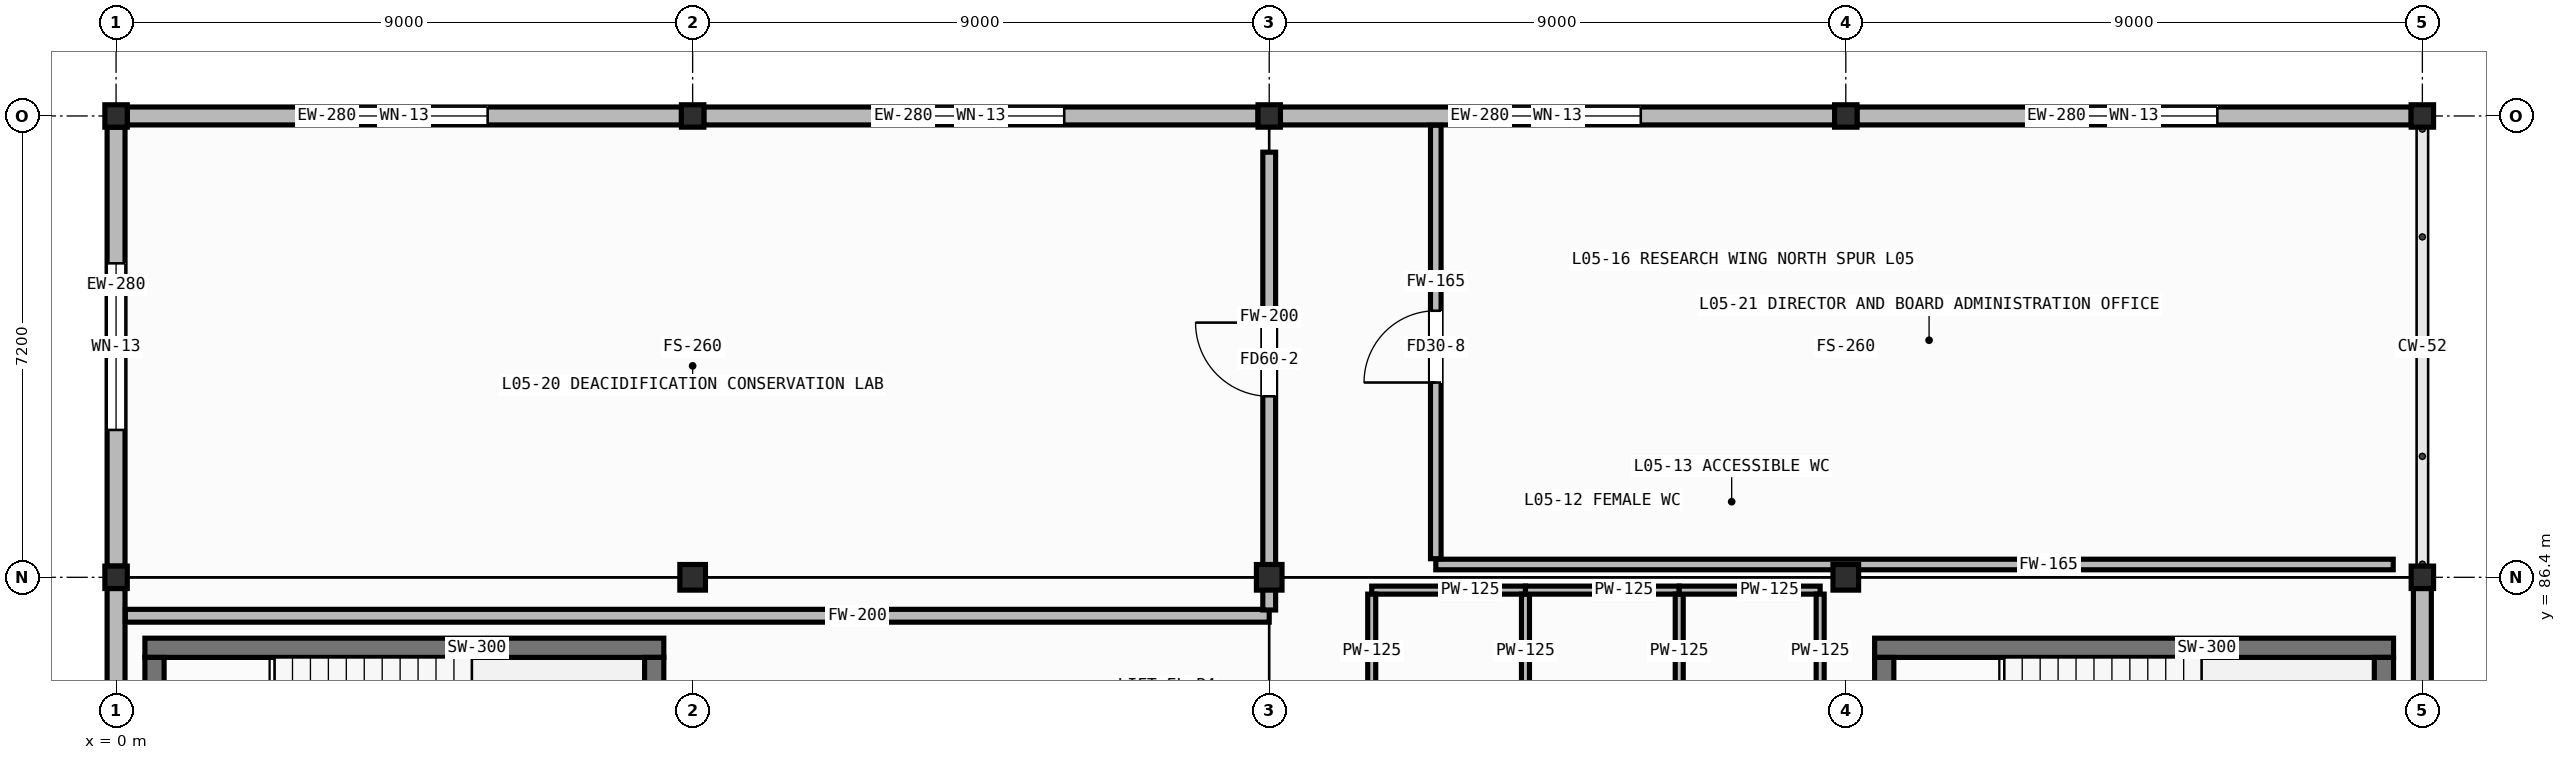
"""IFC4 building model, lengths in metres.
Left out: names, types, materials, properties, quantities, classifications, styles, units other than length and angle.
Written with IfcOpenShell. Run it as: python <this file> out.ifc"""

import sys

from ifc_helpers import new_model, si_unit, direction, frame, frame_2d, origin, origin_2d, place, context, subcontext, project, spatial, rectangle, hollow_rectangle, extrude, element, fill, save


model = new_model("IFC4")
c1 = context("Model", 3, precision=1e-05, world=origin(), true_north=direction((0.0, 1.0)))
c2 = subcontext(c1, "Body", "Model", "MODEL_VIEW")
j1 = project(units=[si_unit("LENGTHUNIT", "METRE"), si_unit("PLANEANGLEUNIT", "RADIAN")], contexts=[c1])
p1 = place(None, origin())
s1 = spatial("IfcSite", under=j1, at=p1, CompositionType="ELEMENT")
p2 = place(p1, origin())
s2 = spatial("IfcBuilding", under=s1, at=p2, CompositionType="ELEMENT")
p3 = place(p2, frame((0.0, 0.0, 17.0)))
s3 = spatial("IfcBuildingStorey", under=s2, at=p3, CompositionType="ELEMENT", Elevation=17.0)
for number, where, z_axis, x_axis in (
    (1, (0.0, 86.4, 0.0), (0.0, 0.0, 1.0), (1.0, 0.0, 0.0)),
    (2, (0.0, 93.6, 0.0), (0.0, 0.0, 1.0), (1.0, 0.0, 0.0)),
):
    element("IfcColumn", number, at=place(p3, frame(where, z_axis=z_axis, x_axis=x_axis)), inside=s3, PredefinedType="COLUMN", context=c2, shape_type="SweptSolid", body=[
        extrude(hollow_rectangle(XDim=0.35, YDim=0.35, WallThickness=0.012, at=origin_2d()), origin(), (0.0, 0.0, 1.0), 3.6),
    ])
p4 = place(p3, frame((9.0, 86.4, 0.0), z_axis=(0.0, 0.0, 1.0), x_axis=(1.0, 0.0, 0.0)))
e3 = element("IfcColumn", 3, at=p4, inside=s3, PredefinedType="COLUMN", context=c2, shape_type="SweptSolid", body=[
    extrude(hollow_rectangle(XDim=0.4, YDim=0.4, WallThickness=0.016, at=origin_2d()), origin(), (0.0, 0.0, 1.0), 3.6),
])
p5 = place(p3, frame((9.0, 93.6, 0.0), z_axis=(0.0, 0.0, 1.0), x_axis=(1.0, 0.0, 0.0)))
e4 = element("IfcColumn", 4, at=p5, inside=s3, PredefinedType="COLUMN", context=c2, shape_type="SweptSolid", body=[
    extrude(hollow_rectangle(XDim=0.35, YDim=0.35, WallThickness=0.012, at=origin_2d()), origin(), (0.0, 0.0, 1.0), 3.6),
])
p6 = place(p3, frame((18.0, 86.4, 0.0), z_axis=(0.0, 0.0, 1.0), x_axis=(1.0, 0.0, 0.0)))
e5 = element("IfcColumn", 5, at=p6, inside=s3, PredefinedType="COLUMN", context=c2, shape_type="SweptSolid", body=[
    extrude(hollow_rectangle(XDim=0.4, YDim=0.4, WallThickness=0.016, at=origin_2d()), origin(), (0.0, 0.0, 1.0), 3.6),
])
p7 = place(p3, frame((18.0, 93.6, 0.0), z_axis=(0.0, 0.0, 1.0), x_axis=(1.0, 0.0, 0.0)))
e6 = element("IfcColumn", 6, at=p7, inside=s3, PredefinedType="COLUMN", context=c2, shape_type="SweptSolid", body=[
    extrude(hollow_rectangle(XDim=0.35, YDim=0.35, WallThickness=0.012, at=origin_2d()), origin(), (0.0, 0.0, 1.0), 3.6),
])
p8 = place(p3, frame((27.0, 86.4, 0.0), z_axis=(0.0, 0.0, 1.0), x_axis=(1.0, 0.0, 0.0)))
e7 = element("IfcColumn", 7, at=p8, inside=s3, PredefinedType="COLUMN", context=c2, shape_type="SweptSolid", body=[
    extrude(hollow_rectangle(XDim=0.4, YDim=0.4, WallThickness=0.016, at=origin_2d()), origin(), (0.0, 0.0, 1.0), 3.6),
])
for number, where, z_axis, x_axis in (
    (8, (27.0, 93.6, 0.0), (0.0, 0.0, 1.0), (1.0, 0.0, 0.0)),
    (9, (36.0, 86.4, 0.0), (0.0, 0.0, 1.0), (1.0, 0.0, 0.0)),
    (10, (36.0, 93.6, 0.0), (0.0, 0.0, 1.0), (1.0, 0.0, 0.0)),
):
    element("IfcColumn", number, at=place(p3, frame(where, z_axis=z_axis, x_axis=x_axis)), inside=s3, PredefinedType="COLUMN", context=c2, shape_type="SweptSolid", body=[
        extrude(hollow_rectangle(XDim=0.35, YDim=0.35, WallThickness=0.012, at=origin_2d()), origin(), (0.0, 0.0, 1.0), 3.6),
    ])
p9 = place(p3, frame((8.825, 93.6, 0.0), z_axis=(0.0, 0.0, 1.0), x_axis=(-1.0, 0.0, 0.0)))
e11 = element("IfcWall", 11, at=p9, inside=s3, PredefinedType="STANDARD", context=c2, shape_type="SweptSolid", body=[
    extrude(rectangle(XDim=8.65, YDim=0.28, at=frame_2d((4.325, 0.0))), origin(), (0.0, 0.0, 1.0), 2.95),
])
p10 = place(p9, frame((3.025, 0.0, 0.85)))
e12 = element("IfcOpeningElement", 12, at=p10, cuts=e11, PredefinedType="OPENING", context=c2, shape_type="SweptSolid", body=[
    extrude(rectangle(XDim=2.6, YDim=1.6, at=frame_2d((1.3, 0.8))), frame((0.0, 0.152, 0.0), z_axis=(0.0, -1.0, 0.0), x_axis=(1.0, 0.0, 0.0)), (0.0, 0.0, 1.0), 0.304),
])
p11 = place(p3, frame((17.825, 93.6, 0.0), z_axis=(0.0, 0.0, 1.0), x_axis=(-1.0, 0.0, 0.0)))
e13 = element("IfcWall", 13, at=p11, inside=s3, PredefinedType="STANDARD", context=c2, shape_type="SweptSolid", body=[
    extrude(rectangle(XDim=8.65, YDim=0.28, at=frame_2d((4.325, 0.0))), origin(), (0.0, 0.0, 1.0), 2.95),
])
p12 = place(p11, frame((3.025, 0.0, 0.85)))
e14 = element("IfcOpeningElement", 14, at=p12, cuts=e13, PredefinedType="OPENING", context=c2, shape_type="SweptSolid", body=[
    extrude(rectangle(XDim=2.6, YDim=1.6, at=frame_2d((1.3, 0.8))), frame((0.0, 0.152, 0.0), z_axis=(0.0, -1.0, 0.0), x_axis=(1.0, 0.0, 0.0)), (0.0, 0.0, 1.0), 0.304),
])
p13 = place(p3, frame((26.825, 93.6, 0.0), z_axis=(0.0, 0.0, 1.0), x_axis=(-1.0, 0.0, 0.0)))
e15 = element("IfcWall", 15, at=p13, inside=s3, PredefinedType="STANDARD", context=c2, shape_type="SweptSolid", body=[
    extrude(rectangle(XDim=8.65, YDim=0.28, at=frame_2d((4.325, 0.0))), origin(), (0.0, 0.0, 1.0), 2.95),
])
p14 = place(p13, frame((3.025, 0.0, 0.85)))
e16 = element("IfcOpeningElement", 16, at=p14, cuts=e15, PredefinedType="OPENING", context=c2, shape_type="SweptSolid", body=[
    extrude(rectangle(XDim=2.6, YDim=1.6, at=frame_2d((1.3, 0.8))), frame((0.0, 0.152, 0.0), z_axis=(0.0, -1.0, 0.0), x_axis=(1.0, 0.0, 0.0)), (0.0, 0.0, 1.0), 0.304),
])
p15 = place(p3, frame((35.825, 93.6, 0.0), z_axis=(0.0, 0.0, 1.0), x_axis=(-1.0, 0.0, 0.0)))
e17 = element("IfcWall", 17, at=p15, inside=s3, PredefinedType="STANDARD", context=c2, shape_type="SweptSolid", body=[
    extrude(rectangle(XDim=8.65, YDim=0.28, at=frame_2d((4.325, 0.0))), origin(), (0.0, 0.0, 1.0), 2.95),
])
p16 = place(p15, frame((3.025, 0.0, 0.85)))
e18 = element("IfcOpeningElement", 18, at=p16, cuts=e17, PredefinedType="OPENING", context=c2, shape_type="SweptSolid", body=[
    extrude(rectangle(XDim=2.6, YDim=1.6, at=frame_2d((1.3, 0.8))), frame((0.0, 0.152, 0.0), z_axis=(0.0, -1.0, 0.0), x_axis=(1.0, 0.0, 0.0)), (0.0, 0.0, 1.0), 0.304),
])
p17 = place(p3, frame((0.0, 79.375, 0.0), z_axis=(0.0, 0.0, 1.0), x_axis=(0.0, 1.0, 0.0)))
e19 = element("IfcWall", 19, at=p17, inside=s3, PredefinedType="STANDARD", context=c2, shape_type="SweptSolid", body=[
    extrude(rectangle(XDim=6.85, YDim=0.28, at=frame_2d((3.425, 0.0))), origin(), (0.0, 0.0, 1.0), 2.94),
])
p18 = place(p3, frame((0.0, 86.575, 0.0), z_axis=(0.0, 0.0, 1.0), x_axis=(0.0, 1.0, 0.0)))
e20 = element("IfcWall", 20, at=p18, inside=s3, PredefinedType="STANDARD", context=c2, shape_type="SweptSolid", body=[
    extrude(rectangle(XDim=6.85, YDim=0.28, at=frame_2d((3.425, 0.0))), origin(), (0.0, 0.0, 1.0), 2.94),
])
p19 = place(p18, frame((2.125, 0.0, 0.85)))
e21 = element("IfcOpeningElement", 21, at=p19, cuts=e20, PredefinedType="OPENING", context=c2, shape_type="SweptSolid", body=[
    extrude(rectangle(XDim=2.6, YDim=1.6, at=frame_2d((1.3, 0.8))), frame((0.0, 0.152, 0.0), z_axis=(0.0, -1.0, 0.0), x_axis=(1.0, 0.0, 0.0)), (0.0, 0.0, 1.0), 0.304),
])
p20 = place(p3, frame((36.0, 86.225, 0.0), z_axis=(0.0, 0.0, 1.0), x_axis=(0.0, -1.0, 0.0)))
e22 = element("IfcWall", 22, at=p20, inside=s3, PredefinedType="STANDARD", context=c2, shape_type="SweptSolid", body=[
    extrude(rectangle(XDim=6.85, YDim=0.28, at=frame_2d((3.425, 0.0))), origin(), (0.0, 0.0, 1.0), 2.94),
])
p21 = place(p3, frame((0.45, 85.3, 0.0), z_axis=(0.0, 0.0, 1.0), x_axis=(1.0, 0.0, 0.0)))
e23 = element("IfcWall", 23, at=p21, inside=s3, PredefinedType="SHEAR", context=c2, shape_type="SweptSolid", body=[
    extrude(rectangle(XDim=8.1, YDim=0.3, at=frame_2d((4.05, 0.0))), origin(), (0.0, 0.0, 1.0), 3.34),
])
for number, where, z_axis, x_axis in (
    (24, (0.6, 81.35, 0.0), (0.0, 0.0, 1.0), (0.0, 1.0, 0.0)),
    (25, (8.4, 81.35, 0.0), (0.0, 0.0, 1.0), (0.0, 1.0, 0.0)),
):
    element("IfcWall", number, at=place(p3, frame(where, z_axis=z_axis, x_axis=x_axis)), inside=s3, PredefinedType="SHEAR", context=c2, shape_type="SweptSolid", body=[
        extrude(rectangle(XDim=3.8, YDim=0.3, at=frame_2d((1.9, 0.0))), origin(), (0.0, 0.0, 1.0), 3.34),
    ])
p22 = place(p3, frame((27.45, 85.3, 0.0), z_axis=(0.0, 0.0, 1.0), x_axis=(1.0, 0.0, 0.0)))
e26 = element("IfcWall", 26, at=p22, inside=s3, PredefinedType="SHEAR", context=c2, shape_type="SweptSolid", body=[
    extrude(rectangle(XDim=8.1, YDim=0.3, at=frame_2d((4.05, 0.0))), origin(), (0.0, 0.0, 1.0), 3.34),
])
for number, where, z_axis, x_axis in (
    (27, (27.6, 81.35, 0.0), (0.0, 0.0, 1.0), (0.0, 1.0, 0.0)),
    (28, (35.4, 81.35, 0.0), (0.0, 0.0, 1.0), (0.0, 1.0, 0.0)),
):
    element("IfcWall", number, at=place(p3, frame(where, z_axis=z_axis, x_axis=x_axis)), inside=s3, PredefinedType="SHEAR", context=c2, shape_type="SweptSolid", body=[
        extrude(rectangle(XDim=3.8, YDim=0.3, at=frame_2d((1.9, 0.0))), origin(), (0.0, 0.0, 1.0), 3.34),
    ])
p23 = place(p3, frame((19.6, 86.2, 0.0), z_axis=(0.0, 0.0, 1.0), x_axis=(1.0, 0.0, 0.0)))
e29 = element("IfcWall", 29, at=p23, inside=s3, PredefinedType="PARTITIONING", context=c2, shape_type="SweptSolid", body=[
    extrude(rectangle(XDim=2.4, YDim=0.125, at=frame_2d((1.2, 0.0))), origin(), (0.0, 0.0, 1.0), 2.62),
])
for number, where, z_axis, x_axis in (
    (30, (19.6, 83.69, 0.0), (0.0, 0.0, 1.0), (0.0, 1.0, 0.0)),
    (31, (22.0, 83.69, 0.0), (0.0, 0.0, 1.0), (0.0, 1.0, 0.0)),
):
    element("IfcWall", number, at=place(p3, frame(where, z_axis=z_axis, x_axis=x_axis)), inside=s3, PredefinedType="PARTITIONING", context=c2, shape_type="SweptSolid", body=[
        extrude(rectangle(XDim=2.448, YDim=0.125, at=frame_2d((1.224, 0.0))), origin(), (0.0, 0.0, 1.0), 3.34),
    ])
p24 = place(p3, frame((22.0, 86.2, 0.0), z_axis=(0.0, 0.0, 1.0), x_axis=(1.0, 0.0, 0.0)))
e32 = element("IfcWall", 32, at=p24, inside=s3, PredefinedType="PARTITIONING", context=c2, shape_type="SweptSolid", body=[
    extrude(rectangle(XDim=2.4, YDim=0.125, at=frame_2d((1.2, 0.0))), origin(), (0.0, 0.0, 1.0), 2.62),
])
p25 = place(p3, frame((24.4, 83.69, 0.0), z_axis=(0.0, 0.0, 1.0), x_axis=(0.0, 1.0, 0.0)))
e33 = element("IfcWall", 33, at=p25, inside=s3, PredefinedType="PARTITIONING", context=c2, shape_type="SweptSolid", body=[
    extrude(rectangle(XDim=2.448, YDim=0.125, at=frame_2d((1.224, 0.0))), origin(), (0.0, 0.0, 1.0), 3.34),
])
p26 = place(p3, frame((24.4, 86.2, 0.0), z_axis=(0.0, 0.0, 1.0), x_axis=(1.0, 0.0, 0.0)))
e34 = element("IfcWall", 34, at=p26, inside=s3, PredefinedType="PARTITIONING", context=c2, shape_type="SweptSolid", body=[
    extrude(rectangle(XDim=2.2, YDim=0.125, at=frame_2d((1.1, 0.0))), origin(), (0.0, 0.0, 1.0), 2.62),
])
p27 = place(p3, frame((26.6, 83.69, 0.0), z_axis=(0.0, 0.0, 1.0), x_axis=(0.0, 1.0, 0.0)))
e35 = element("IfcWall", 35, at=p27, inside=s3, PredefinedType="PARTITIONING", context=c2, shape_type="SweptSolid", body=[
    extrude(rectangle(XDim=2.448, YDim=0.125, at=frame_2d((1.224, 0.0))), origin(), (0.0, 0.0, 1.0), 3.34),
])
p28 = place(p3, frame((0.145, 85.8, 0.0), z_axis=(0.0, 0.0, 1.0), x_axis=(1.0, 0.0, 0.0)))
e36 = element("IfcWall", 36, at=p28, inside=s3, PredefinedType="PARTITIONING", context=c2, shape_type="SweptSolid", body=[
    extrude(rectangle(XDim=17.855, YDim=0.2, at=frame_2d((8.927, 0.0))), origin(), (0.0, 0.0, 1.0), 3.34),
])
p29 = place(p3, frame((18.0, 85.89, 0.0), z_axis=(0.0, 0.0, 1.0), x_axis=(0.0, 1.0, 0.0)))
e37 = element("IfcWall", 37, at=p29, inside=s3, PredefinedType="PARTITIONING", context=c2, shape_type="SweptSolid", body=[
    extrude(rectangle(XDim=7.145, YDim=0.2, at=frame_2d((3.573, 0.0))), origin(), (0.0, 0.0, 1.0), 2.62),
])
p30 = place(p29, frame((3.335, 0.0, 0.0)))
e38 = element("IfcOpeningElement", 38, at=p30, cuts=e37, PredefinedType="OPENING", context=c2, shape_type="SweptSolid", body=[
    extrude(rectangle(XDim=1.15, YDim=2.1, at=frame_2d((0.575, 1.05))), frame((0.0, 0.112, 0.0), z_axis=(0.0, -1.0, 0.0), x_axis=(1.0, 0.0, 0.0)), (0.0, 0.0, 1.0), 0.224),
])
p31 = place(p3, frame((20.6, 86.6, 0.0), z_axis=(0.0, 0.0, 1.0), x_axis=(1.0, 0.0, 0.0)))
e39 = element("IfcWall", 39, at=p31, inside=s3, PredefinedType="PARTITIONING", context=c2, shape_type="SweptSolid", body=[
    extrude(rectangle(XDim=14.945, YDim=0.165, at=frame_2d((7.472, 0.0))), origin(), (0.0, 0.0, 1.0), 2.62),
])
p32 = place(p3, frame((20.6, 86.69, 0.0), z_axis=(0.0, 0.0, 1.0), x_axis=(0.0, 1.0, 0.0)))
e40 = element("IfcWall", 40, at=p32, inside=s3, PredefinedType="PARTITIONING", context=c2, shape_type="SweptSolid", body=[
    extrude(rectangle(XDim=6.765, YDim=0.165, at=frame_2d((3.383, 0.0))), origin(), (0.0, 0.0, 1.0), 3.34),
])
p33 = place(p32, frame((2.75, 0.0, 0.0)))
e41 = element("IfcOpeningElement", 41, at=p33, cuts=e40, PredefinedType="OPENING", context=c2, shape_type="SweptSolid", body=[
    extrude(rectangle(XDim=1.12, YDim=2.08, at=frame_2d((0.56, 1.04))), frame((0.0, 0.094, 0.0), z_axis=(0.0, -1.0, 0.0), x_axis=(1.0, 0.0, 0.0)), (0.0, 0.0, 1.0), 0.189),
])
p34 = place(p10, origin())
e42 = element("IfcWindow", 42, at=p34, inside=s3, PartitioningType="DOUBLE_PANEL_VERTICAL", PredefinedType="WINDOW", context=c2, shape_type="SweptSolid", body=[
    extrude(rectangle(XDim=2.6, YDim=1.6, at=frame_2d((1.3, 0.8))), frame((0.0, 0.03, 0.0), z_axis=(0.0, -1.0, 0.0), x_axis=(1.0, 0.0, 0.0)), (0.0, 0.0, 1.0), 0.06),
])
fill(e12, e42)
p35 = place(p12, origin())
e43 = element("IfcWindow", 43, at=p35, inside=s3, PartitioningType="DOUBLE_PANEL_VERTICAL", PredefinedType="WINDOW", context=c2, shape_type="SweptSolid", body=[
    extrude(rectangle(XDim=2.6, YDim=1.6, at=frame_2d((1.3, 0.8))), frame((0.0, 0.03, 0.0), z_axis=(0.0, -1.0, 0.0), x_axis=(1.0, 0.0, 0.0)), (0.0, 0.0, 1.0), 0.06),
])
fill(e14, e43)
p36 = place(p14, origin())
e44 = element("IfcWindow", 44, at=p36, inside=s3, PartitioningType="DOUBLE_PANEL_VERTICAL", PredefinedType="WINDOW", context=c2, shape_type="SweptSolid", body=[
    extrude(rectangle(XDim=2.6, YDim=1.6, at=frame_2d((1.3, 0.8))), frame((0.0, 0.03, 0.0), z_axis=(0.0, -1.0, 0.0), x_axis=(1.0, 0.0, 0.0)), (0.0, 0.0, 1.0), 0.06),
])
fill(e16, e44)
p37 = place(p16, origin())
e45 = element("IfcWindow", 45, at=p37, inside=s3, PartitioningType="DOUBLE_PANEL_VERTICAL", PredefinedType="WINDOW", context=c2, shape_type="SweptSolid", body=[
    extrude(rectangle(XDim=2.6, YDim=1.6, at=frame_2d((1.3, 0.8))), frame((0.0, 0.03, 0.0), z_axis=(0.0, -1.0, 0.0), x_axis=(1.0, 0.0, 0.0)), (0.0, 0.0, 1.0), 0.06),
])
fill(e18, e45)
p38 = place(p19, origin())
e46 = element("IfcWindow", 46, at=p38, inside=s3, PartitioningType="DOUBLE_PANEL_VERTICAL", PredefinedType="WINDOW", context=c2, shape_type="SweptSolid", body=[
    extrude(rectangle(XDim=2.6, YDim=1.6, at=frame_2d((1.3, 0.8))), frame((0.0, 0.03, 0.0), z_axis=(0.0, -1.0, 0.0), x_axis=(1.0, 0.0, 0.0)), (0.0, 0.0, 1.0), 0.06),
])
fill(e21, e46)
p39 = place(p30, origin())
e47 = element("IfcDoor", 47, at=p39, inside=s3, OperationType="SINGLE_SWING_RIGHT", PredefinedType="DOOR", context=c2, shape_type="SweptSolid", body=[
    extrude(rectangle(XDim=1.15, YDim=2.1, at=frame_2d((0.575, 1.05))), frame((0.0, 0.025, 0.0), z_axis=(0.0, -1.0, 0.0), x_axis=(1.0, 0.0, 0.0)), (0.0, 0.0, 1.0), 0.05),
])
fill(e38, e47)
p40 = place(p33, origin())
e48 = element("IfcDoor", 48, at=p40, inside=s3, OperationType="SINGLE_SWING_LEFT", PredefinedType="DOOR", context=c2, shape_type="SweptSolid", body=[
    extrude(rectangle(XDim=1.12, YDim=2.08, at=frame_2d((0.56, 1.04))), frame((0.0, 0.025, 0.0), z_axis=(0.0, -1.0, 0.0), x_axis=(1.0, 0.0, 0.0)), (0.0, 0.0, 1.0), 0.05),
])
fill(e41, e48)
save(model, sys.argv[1])
